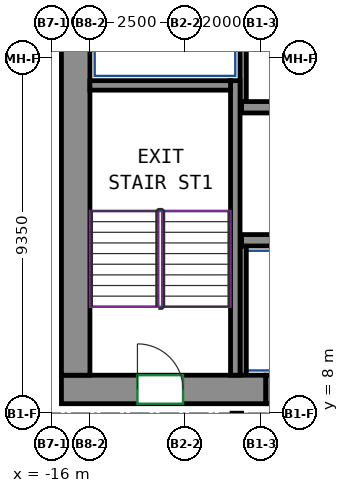
"""IFC4 building model, lengths in metres.
Left out: names, types, materials, properties, quantities, classifications, styles, units other than length and angle.
Written with IfcOpenShell. Run it as: python <this file> out.ifc"""

import sys

from ifc_helpers import new_model, si_unit, direction, frame, frame_2d, origin, place, context, subcontext, project, spatial, rectangle, extrude, source, transform, mapped, element, fill, save


model = new_model("IFC4")
c1 = context("Model", 3, precision=1e-05, world=origin(), true_north=direction((0.0, 1.0)))
c2 = subcontext(c1, "Body", "Model", "MODEL_VIEW")
j1 = project(units=[si_unit("LENGTHUNIT", "METRE"), si_unit("PLANEANGLEUNIT", "RADIAN")], contexts=[c1])
p1 = place(None, origin())
s1 = spatial("IfcSite", under=j1, at=p1, CompositionType="ELEMENT")
p2 = place(p1, origin())
s2 = spatial("IfcBuilding", under=s1, at=p2, CompositionType="ELEMENT")
p3 = place(p2, frame((0.0, 0.0, 192.3)))
s3 = spatial("IfcBuildingStorey", under=s2, at=p3, CompositionType="ELEMENT", Elevation=192.3)
m1 = source(origin(), c2, "Body", "SweptSolid", [
    extrude(rectangle(XDim=5.38, YDim=0.75, at=frame_2d((2.69, 0.0))), origin(), (0.0, 0.0, 1.0), 3.0),
])
p4 = place(p3, frame((-15.75, 8.625, 0.0), z_axis=(0.0, 0.0, 1.0), x_axis=(1.0, 0.0, 0.0)))
e1 = element("IfcWall", 1, at=p4, inside=s3, PredefinedType="SHEAR", context=c2, shape_type="MappedRepresentation", body=[
    mapped(m1, transform((0.0, 0.0, 0.0))),
])
p5 = place(p4, frame((2.0, 0.0, 0.0)))
e2 = element("IfcOpeningElement", 2, at=p5, cuts=e1, PredefinedType="OPENING", context=c2, shape_type="SweptSolid", body=[
    extrude(rectangle(XDim=1.2, YDim=2.1, at=frame_2d((0.6, 1.05))), frame((0.0, 0.385, 0.0), z_axis=(0.0, -1.0, 0.0), x_axis=(1.0, 0.0, 0.0)), (0.0, 0.0, 1.0), 0.77),
])
m2 = source(origin(), c2, "Body", "SweptSolid", [
    extrude(rectangle(XDim=12.0, YDim=0.75, at=frame_2d((6.0, 0.0))), origin(), (0.0, 0.0, 1.0), 3.0),
])
p6 = place(p3, frame((-15.375, 9.0, 0.0), z_axis=(0.0, 0.0, 1.0), x_axis=(0.0, 1.0, 0.0)))
e3 = element("IfcWall", 3, at=p6, inside=s3, PredefinedType="SHEAR", context=c2, shape_type="MappedRepresentation", body=[
    mapped(m2, transform((0.0, 0.0, 0.0))),
])
m3 = source(origin(), c2, "Body", "SweptSolid", [
    extrude(rectangle(XDim=7.75, YDim=0.25, at=frame_2d((3.875, 0.0))), origin(), (0.0, 0.0, 1.0), 3.0),
])
p7 = place(p3, frame((-11.175, 9.0, 0.0), z_axis=(0.0, 0.0, 1.0), x_axis=(0.0, 1.0, 0.0)))
e4 = element("IfcWall", 4, at=p7, inside=s3, PredefinedType="SHEAR", context=c2, shape_type="MappedRepresentation", body=[
    mapped(m3, transform((0.0, 0.0, 0.0))),
])
m4 = source(origin(), c2, "Body", "SweptSolid", [
    extrude(rectangle(XDim=3.7, YDim=0.25, at=frame_2d((1.85, 0.0))), origin(), (0.0, 0.0, 1.0), 3.0),
])
p8 = place(p3, frame((-15.0, 16.625, 0.0), z_axis=(0.0, 0.0, 1.0), x_axis=(1.0, 0.0, 0.0)))
e5 = element("IfcWall", 5, at=p8, inside=s3, PredefinedType="SHEAR", context=c2, shape_type="MappedRepresentation", body=[
    mapped(m4, transform((0.0, 0.0, 0.0))),
])
m5 = source(origin(), c2, "Body", "SweptSolid", [
    extrude(rectangle(XDim=6.0, YDim=0.3, at=frame_2d((3.0, 0.0))), origin(), (0.0, 0.0, 1.0), 3.0),
])
p9 = place(p3, frame((-11.01, 12.55, 0.0), z_axis=(0.0, 0.0, 1.0), x_axis=(1.0, 0.0, 0.0)))
e6 = element("IfcWall", 6, at=p9, inside=s3, PredefinedType="SHEAR", context=c2, shape_type="MappedRepresentation", body=[
    mapped(m5, transform((0.0, 0.0, 0.0))),
])
m6 = source(origin(), c2, "Body", "SweptSolid", [
    extrude(rectangle(XDim=14.04, YDim=0.3, at=frame_2d((7.02, 0.0))), origin(), (0.0, 0.0, 1.0), 3.0),
])
p10 = place(p3, frame((-11.01, 16.05, 0.0), z_axis=(0.0, 0.0, 1.0), x_axis=(1.0, 0.0, 0.0)))
e7 = element("IfcWall", 7, at=p10, inside=s3, PredefinedType="SHEAR", context=c2, shape_type="MappedRepresentation", body=[
    mapped(m6, transform((0.0, 0.0, 0.0))),
])
m7 = source(origin(), c2, "Body", "SweptSolid", [
    extrude(rectangle(XDim=4.8, YDim=0.165, at=frame_2d((2.4, 0.0))), origin(), (0.0, 0.0, 1.0), 3.0),
])
p11 = place(p3, frame((-10.968, 16.2, 0.0), z_axis=(0.0, 0.0, 1.0), x_axis=(0.0, 1.0, 0.0)))
e8 = element("IfcWall", 8, at=p11, inside=s3, PredefinedType="PARTITIONING", context=c2, shape_type="MappedRepresentation", body=[
    mapped(m7, transform((0.0, 0.0, 0.0))),
])
m8 = source(origin(), c2, "Body", "SweptSolid", [
    extrude(rectangle(XDim=3.4, YDim=0.165, at=frame_2d((1.7, 0.0))), origin(), (0.0, 0.0, 1.0), 3.0),
])
p12 = place(p3, frame((-10.968, 9.0, 0.0), z_axis=(0.0, 0.0, 1.0), x_axis=(0.0, 1.0, 0.0)))
e9 = element("IfcWall", 9, at=p12, inside=s3, PredefinedType="PARTITIONING", context=c2, shape_type="MappedRepresentation", body=[
    mapped(m8, transform((0.0, 0.0, 0.0))),
])
m9 = source(origin(), c2, "Body", "SweptSolid", [
    extrude(rectangle(XDim=1.4, YDim=0.75, at=frame_2d((0.7, 0.0))), origin(), (0.0, 0.0, 1.0), 2.7),
])
p13 = place(p3, frame((-10.37, 8.625, 0.0), z_axis=(0.0, 0.0, 1.0), x_axis=(1.0, 0.0, 0.0)))
e10 = element("IfcWall", 10, at=p13, inside=s3, PredefinedType="PARTITIONING", context=c2, shape_type="MappedRepresentation", body=[
    mapped(m9, transform((0.0, 0.0, 0.0))),
])
p14 = place(p13, frame((0.25, 0.0, 0.0)))
e11 = element("IfcOpeningElement", 11, at=p14, cuts=e10, PredefinedType="OPENING", context=c2, shape_type="SweptSolid", body=[
    extrude(rectangle(XDim=0.9, YDim=2.1, at=frame_2d((0.45, 1.05))), frame((0.0, 0.385, 0.0), z_axis=(0.0, -1.0, 0.0), x_axis=(1.0, 0.0, 0.0)), (0.0, 0.0, 1.0), 0.77),
])
p15 = place(p5, origin())
e12 = element("IfcDoor", 12, at=p15, inside=s3, OperationType="DOUBLE_DOOR_SINGLE_SWING", PredefinedType="DOOR", context=c2, shape_type="SweptSolid", body=[
    extrude(rectangle(XDim=1.2, YDim=2.1, at=frame_2d((0.6, 1.05))), frame((0.0, 0.28, 0.0), z_axis=(0.0, -1.0, 0.0), x_axis=(1.0, 0.0, 0.0)), (0.0, 0.0, 1.0), 0.05),
])
fill(e2, e12)
save(model, sys.argv[1])
